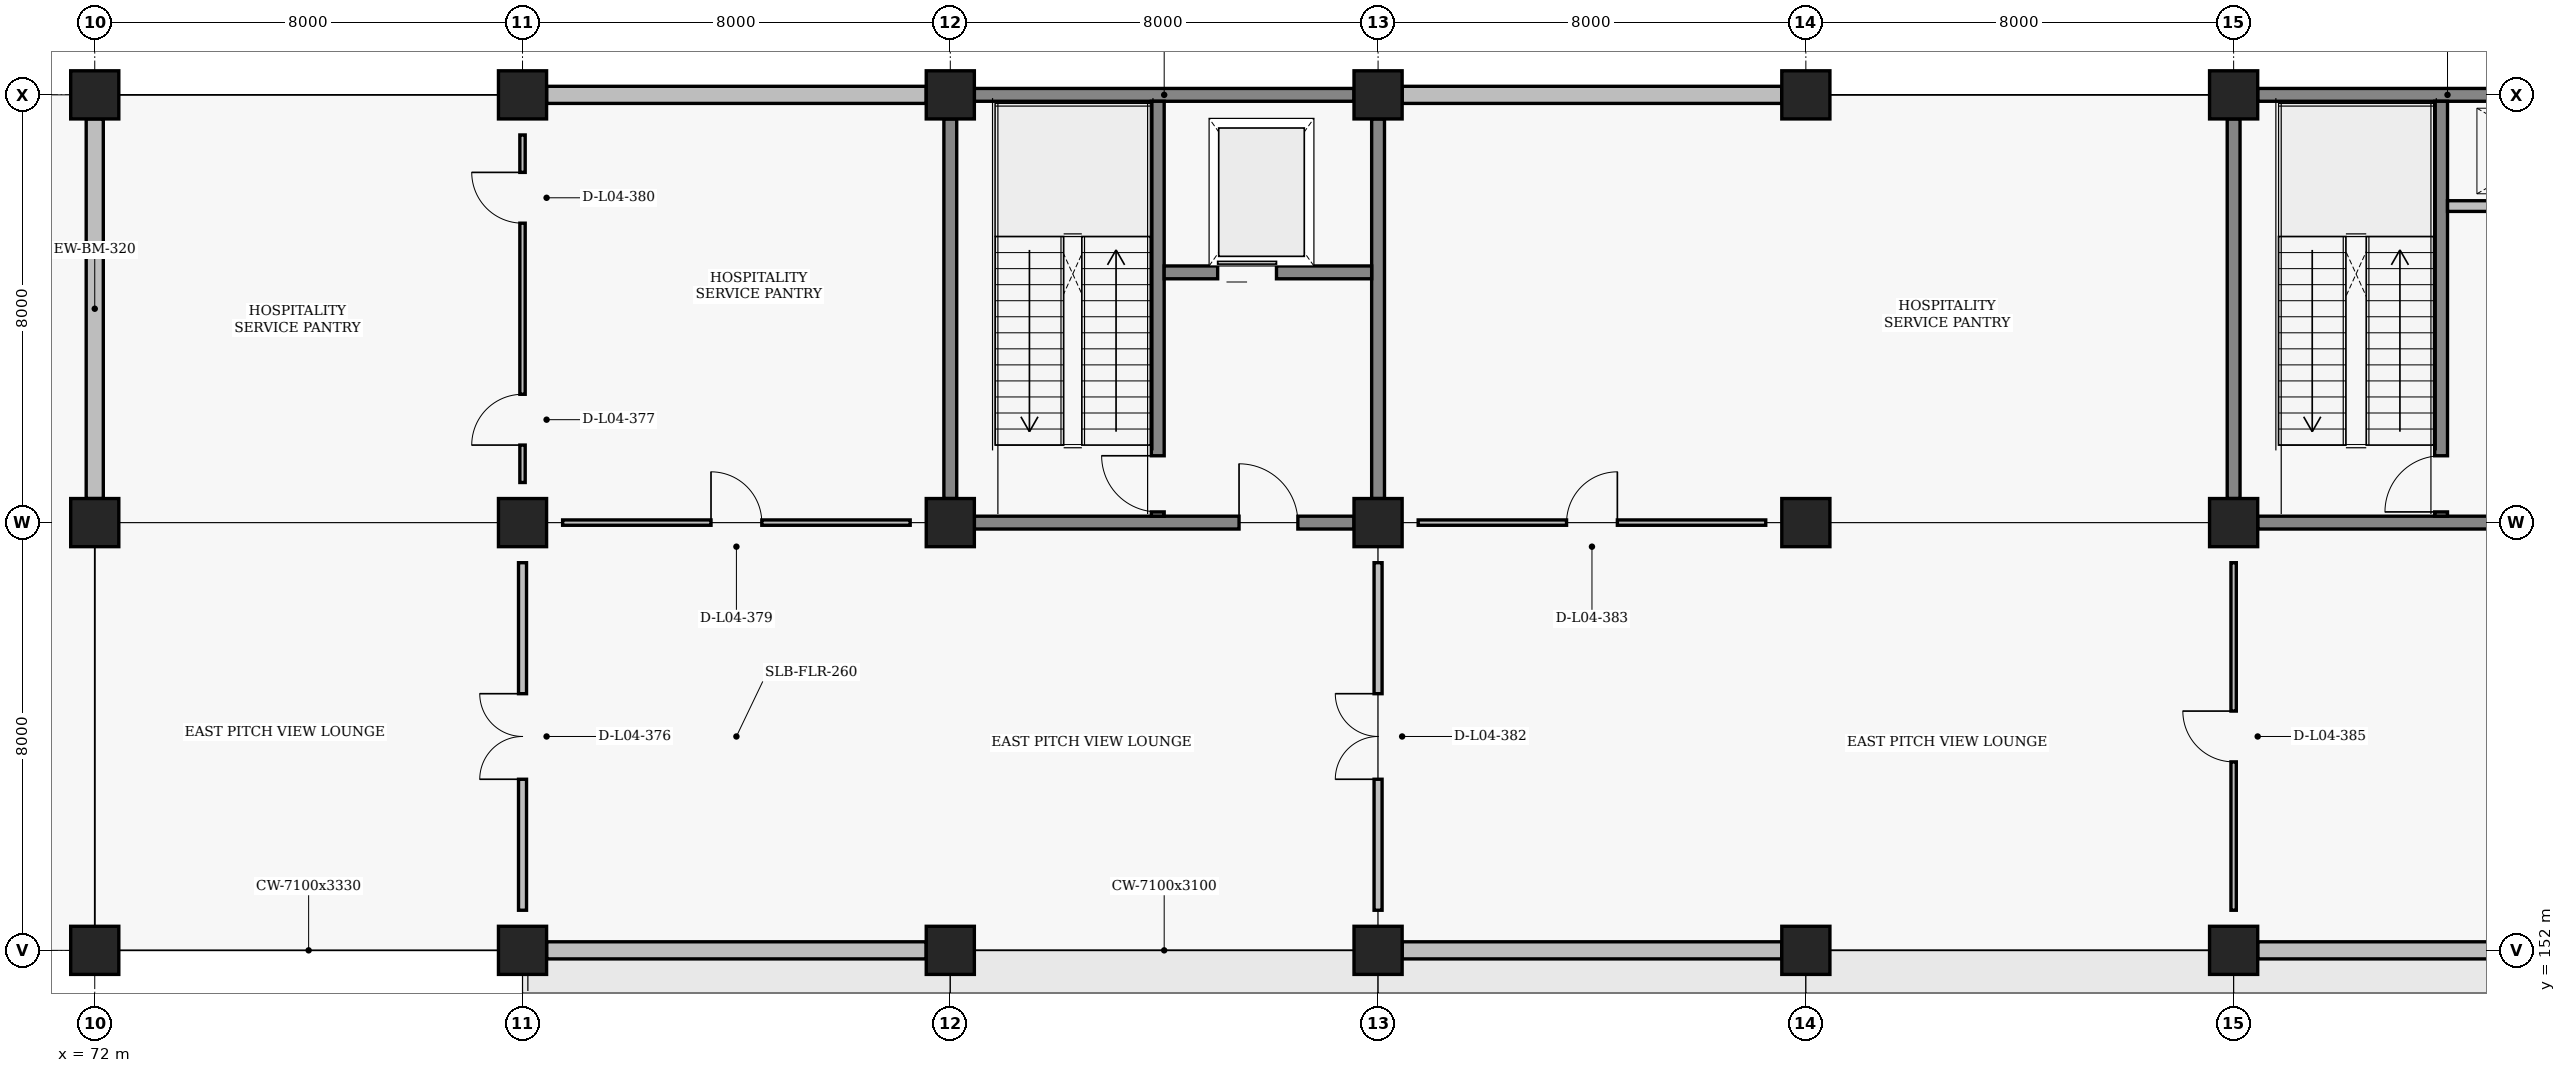
"""IFC4 building model, lengths in metres.
Left out: names, types, materials, properties, quantities, classifications, styles, units other than length and angle.
Written with IfcOpenShell. Run it as: python <this file> out.ifc"""

import sys

from ifc_helpers import new_model, si_unit, direction, frame, frame_2d, origin, origin_2d, place, context, subcontext, project, spatial, rectangle, extrude, element, fill, save


model = new_model("IFC4")
c1 = context("Model", 3, precision=1e-05, world=origin(), true_north=direction((0.0, 1.0)))
c2 = subcontext(c1, "Body", "Model", "MODEL_VIEW")
j1 = project(units=[si_unit("LENGTHUNIT", "METRE"), si_unit("PLANEANGLEUNIT", "RADIAN")], contexts=[c1])
p1 = place(None, origin())
s1 = spatial("IfcSite", under=j1, at=p1, CompositionType="ELEMENT")
p2 = place(p1, origin())
s2 = spatial("IfcBuilding", under=s1, at=p2, CompositionType="ELEMENT")
p3 = place(p2, frame((0.0, 0.0, 14.4)))
s3 = spatial("IfcBuildingStorey", under=s2, at=p3, CompositionType="ELEMENT", Elevation=14.4)
for number, where, z_axis, x_axis in (
    (1, (72.0, 152.0, 0.0), (0.0, 0.0, 1.0), (1.0, 0.0, 0.0)),
    (2, (72.0, 160.0, 0.0), (0.0, 0.0, 1.0), (1.0, 0.0, 0.0)),
    (3, (72.0, 168.0, 0.0), (0.0, 0.0, 1.0), (1.0, 0.0, 0.0)),
    (4, (80.0, 152.0, 0.0), (0.0, 0.0, 1.0), (1.0, 0.0, 0.0)),
    (5, (80.0, 160.0, 0.0), (0.0, 0.0, 1.0), (1.0, 0.0, 0.0)),
    (6, (80.0, 168.0, 0.0), (0.0, 0.0, 1.0), (1.0, 0.0, 0.0)),
    (7, (88.0, 152.0, 0.0), (0.0, 0.0, 1.0), (1.0, 0.0, 0.0)),
    (8, (88.0, 160.0, 0.0), (0.0, 0.0, 1.0), (1.0, 0.0, 0.0)),
    (9, (88.0, 168.0, 0.0), (0.0, 0.0, 1.0), (1.0, 0.0, 0.0)),
    (10, (96.0, 152.0, 0.0), (0.0, 0.0, 1.0), (1.0, 0.0, 0.0)),
    (11, (96.0, 160.0, 0.0), (0.0, 0.0, 1.0), (1.0, 0.0, 0.0)),
    (12, (96.0, 168.0, 0.0), (0.0, 0.0, 1.0), (1.0, 0.0, 0.0)),
    (13, (104.0, 152.0, 0.0), (0.0, 0.0, 1.0), (1.0, 0.0, 0.0)),
    (14, (104.0, 160.0, 0.0), (0.0, 0.0, 1.0), (1.0, 0.0, 0.0)),
    (15, (104.0, 168.0, 0.0), (0.0, 0.0, 1.0), (1.0, 0.0, 0.0)),
    (16, (112.0, 152.0, 0.0), (0.0, 0.0, 1.0), (1.0, 0.0, 0.0)),
    (17, (112.0, 160.0, 0.0), (0.0, 0.0, 1.0), (1.0, 0.0, 0.0)),
    (18, (112.0, 168.0, 0.0), (0.0, 0.0, 1.0), (1.0, 0.0, 0.0)),
):
    element("IfcColumn", number, at=place(p3, frame(where, z_axis=z_axis, x_axis=x_axis)), inside=s3, PredefinedType="COLUMN", context=c2, shape_type="SweptSolid", body=[
        extrude(rectangle(XDim=0.9, YDim=0.9, at=origin_2d()), origin(), (0.0, 0.0, 1.0), 4.2),
    ])
p4 = place(p3, frame((72.0, 160.45, 0.0), z_axis=(0.0, 0.0, 1.0), x_axis=(0.0, 1.0, 0.0)))
e19 = element("IfcWall", 19, at=p4, inside=s3, PredefinedType="SOLIDWALL", context=c2, shape_type="SweptSolid", body=[
    extrude(rectangle(XDim=7.1, YDim=0.32, at=frame_2d((3.55, 0.0))), origin(), (0.0, 0.0, 1.0), 3.35),
])
p5 = place(p3, frame((80.45, 152.0, 0.0), z_axis=(0.0, 0.0, 1.0), x_axis=(1.0, 0.0, 0.0)))
e20 = element("IfcWall", 20, at=p5, inside=s3, PredefinedType="SOLIDWALL", context=c2, shape_type="SweptSolid", body=[
    extrude(rectangle(XDim=7.1, YDim=0.32, at=frame_2d((3.55, 0.0))), origin(), (0.0, 0.0, 1.0), 3.1),
])
p6 = place(p3, frame((80.45, 168.0, 0.0), z_axis=(0.0, 0.0, 1.0), x_axis=(1.0, 0.0, 0.0)))
e21 = element("IfcWall", 21, at=p6, inside=s3, PredefinedType="SOLIDWALL", context=c2, shape_type="SweptSolid", body=[
    extrude(rectangle(XDim=7.1, YDim=0.32, at=frame_2d((3.55, 0.0))), origin(), (0.0, 0.0, 1.0), 3.33),
])
p7 = place(p3, frame((96.45, 152.0, 0.0), z_axis=(0.0, 0.0, 1.0), x_axis=(1.0, 0.0, 0.0)))
e22 = element("IfcWall", 22, at=p7, inside=s3, PredefinedType="SOLIDWALL", context=c2, shape_type="SweptSolid", body=[
    extrude(rectangle(XDim=7.1, YDim=0.32, at=frame_2d((3.55, 0.0))), origin(), (0.0, 0.0, 1.0), 3.1),
])
p8 = place(p3, frame((96.45, 168.0, 0.0), z_axis=(0.0, 0.0, 1.0), x_axis=(1.0, 0.0, 0.0)))
e23 = element("IfcWall", 23, at=p8, inside=s3, PredefinedType="SOLIDWALL", context=c2, shape_type="SweptSolid", body=[
    extrude(rectangle(XDim=7.1, YDim=0.32, at=frame_2d((3.55, 0.0))), origin(), (0.0, 0.0, 1.0), 3.33),
])
p9 = place(p3, frame((112.45, 152.0, 0.0), z_axis=(0.0, 0.0, 1.0), x_axis=(1.0, 0.0, 0.0)))
e24 = element("IfcWall", 24, at=p9, inside=s3, PredefinedType="SOLIDWALL", context=c2, shape_type="SweptSolid", body=[
    extrude(rectangle(XDim=7.1, YDim=0.32, at=frame_2d((3.55, 0.0))), origin(), (0.0, 0.0, 1.0), 3.1),
])
p10 = place(p3, frame((88.45, 160.0, 0.0), z_axis=(0.0, 0.0, 1.0), x_axis=(1.0, 0.0, 0.0)))
e25 = element("IfcWall", 25, at=p10, inside=s3, PredefinedType="SHEAR", context=c2, shape_type="SweptSolid", body=[
    extrude(rectangle(XDim=7.1, YDim=0.24, at=frame_2d((3.55, 0.0))), origin(), (0.0, 0.0, 1.0), 3.33),
])
p11 = place(p10, frame((4.95, 0.0, 0.0)))
e26 = element("IfcOpeningElement", 26, at=p11, cuts=e25, PredefinedType="OPENING", context=c2, shape_type="SweptSolid", body=[
    extrude(rectangle(XDim=1.1, YDim=2.2, at=frame_2d((0.55, 1.1))), frame((0.0, 0.13, 0.0), z_axis=(0.0, -1.0, 0.0), x_axis=(1.0, 0.0, 0.0)), (0.0, 0.0, 1.0), 0.26),
])
for number, where, z_axis, x_axis in (
    (27, (88.45, 168.0, 0.0), (0.0, 0.0, 1.0), (1.0, 0.0, 0.0)),
    (28, (88.0, 160.45, 0.0), (0.0, 0.0, 1.0), (0.0, 1.0, 0.0)),
    (29, (96.0, 160.45, 0.0), (0.0, 0.0, 1.0), (0.0, 1.0, 0.0)),
):
    element("IfcWall", number, at=place(p3, frame(where, z_axis=z_axis, x_axis=x_axis)), inside=s3, PredefinedType="SHEAR", context=c2, shape_type="SweptSolid", body=[
        extrude(rectangle(XDim=7.1, YDim=0.24, at=frame_2d((3.55, 0.0))), origin(), (0.0, 0.0, 1.0), 3.33),
    ])
p12 = place(p3, frame((91.88, 160.12, 0.0), z_axis=(0.0, 0.0, 1.0), x_axis=(0.0, 1.0, 0.0)))
e30 = element("IfcWall", 30, at=p12, inside=s3, PredefinedType="SHEAR", context=c2, shape_type="SweptSolid", body=[
    extrude(rectangle(XDim=7.76, YDim=0.24, at=frame_2d((3.88, 0.0))), origin(), (0.0, 0.0, 1.0), 3.43),
])
p13 = place(p12, frame((0.08, 0.0, 0.0)))
e31 = element("IfcOpeningElement", 31, at=p13, cuts=e30, PredefinedType="OPENING", context=c2, shape_type="SweptSolid", body=[
    extrude(rectangle(XDim=1.05, YDim=2.15, at=frame_2d((0.525, 1.075))), frame((0.0, 0.13, 0.0), z_axis=(0.0, -1.0, 0.0), x_axis=(1.0, 0.0, 0.0)), (0.0, 0.0, 1.0), 0.26),
])
p14 = place(p3, frame((92.0, 164.68, 0.0), z_axis=(0.0, 0.0, 1.0), x_axis=(1.0, 0.0, 0.0)))
e32 = element("IfcWall", 32, at=p14, inside=s3, PredefinedType="SHEAR", context=c2, shape_type="SweptSolid", body=[
    extrude(rectangle(XDim=3.88, YDim=0.24, at=frame_2d((1.94, 0.0))), origin(), (0.0, 0.0, 1.0), 3.33),
])
p15 = place(p14, frame((1.0, 0.0, 0.0)))
e33 = element("IfcOpeningElement", 33, at=p15, cuts=e32, PredefinedType="OPENING", context=c2, shape_type="SweptSolid", body=[
    extrude(rectangle(XDim=1.1, YDim=2.15, at=frame_2d((0.55, 1.075))), frame((0.0, 0.13, 0.0), z_axis=(0.0, -1.0, 0.0), x_axis=(1.0, 0.0, 0.0)), (0.0, 0.0, 1.0), 0.26),
])
p16 = place(p3, frame((112.45, 160.0, 0.0), z_axis=(0.0, 0.0, 1.0), x_axis=(1.0, 0.0, 0.0)))
e34 = element("IfcWall", 34, at=p16, inside=s3, PredefinedType="SHEAR", context=c2, shape_type="SweptSolid", body=[
    extrude(rectangle(XDim=7.1, YDim=0.24, at=frame_2d((3.55, 0.0))), origin(), (0.0, 0.0, 1.0), 3.33),
])
p17 = place(p16, frame((4.95, 0.0, 0.0)))
e35 = element("IfcOpeningElement", 35, at=p17, cuts=e34, PredefinedType="OPENING", context=c2, shape_type="SweptSolid", body=[
    extrude(rectangle(XDim=1.1, YDim=2.2, at=frame_2d((0.55, 1.1))), frame((0.0, 0.13, 0.0), z_axis=(0.0, -1.0, 0.0), x_axis=(1.0, 0.0, 0.0)), (0.0, 0.0, 1.0), 0.26),
])
for number, where, z_axis, x_axis in (
    (36, (112.45, 168.0, 0.0), (0.0, 0.0, 1.0), (1.0, 0.0, 0.0)),
    (37, (112.0, 160.45, 0.0), (0.0, 0.0, 1.0), (0.0, 1.0, 0.0)),
):
    element("IfcWall", number, at=place(p3, frame(where, z_axis=z_axis, x_axis=x_axis)), inside=s3, PredefinedType="SHEAR", context=c2, shape_type="SweptSolid", body=[
        extrude(rectangle(XDim=7.1, YDim=0.24, at=frame_2d((3.55, 0.0))), origin(), (0.0, 0.0, 1.0), 3.33),
    ])
p18 = place(p3, frame((115.88, 160.12, 0.0), z_axis=(0.0, 0.0, 1.0), x_axis=(0.0, 1.0, 0.0)))
e38 = element("IfcWall", 38, at=p18, inside=s3, PredefinedType="SHEAR", context=c2, shape_type="SweptSolid", body=[
    extrude(rectangle(XDim=7.76, YDim=0.24, at=frame_2d((3.88, 0.0))), origin(), (0.0, 0.0, 1.0), 3.43),
])
p19 = place(p18, frame((0.08, 0.0, 0.0)))
e39 = element("IfcOpeningElement", 39, at=p19, cuts=e38, PredefinedType="OPENING", context=c2, shape_type="SweptSolid", body=[
    extrude(rectangle(XDim=1.05, YDim=2.15, at=frame_2d((0.525, 1.075))), frame((0.0, 0.13, 0.0), z_axis=(0.0, -1.0, 0.0), x_axis=(1.0, 0.0, 0.0)), (0.0, 0.0, 1.0), 0.26),
])
p20 = place(p3, frame((116.0, 165.92, 0.0), z_axis=(0.0, 0.0, 1.0), x_axis=(1.0, 0.0, 0.0)))
e40 = element("IfcWall", 40, at=p20, inside=s3, PredefinedType="PARTITIONING", context=c2, shape_type="SweptSolid", body=[
    extrude(rectangle(XDim=3.88, YDim=0.2, at=frame_2d((1.94, 0.0))), origin(), (0.0, 0.0, 1.0), 3.33),
])
p21 = place(p20, frame((1.25, 0.0, 0.0)))
e41 = element("IfcOpeningElement", 41, at=p21, cuts=e40, PredefinedType="OPENING", context=c2, shape_type="SweptSolid", body=[
    extrude(rectangle(XDim=0.85, YDim=2.05, at=frame_2d((0.425, 1.025))), frame((0.0, 0.11, 0.0), z_axis=(0.0, -1.0, 0.0), x_axis=(1.0, 0.0, 0.0)), (0.0, 0.0, 1.0), 0.22),
])
p22 = place(p3, frame((80.0, 152.75, 0.0), z_axis=(0.0, 0.0, 1.0), x_axis=(0.0, 1.0, 0.0)))
e42 = element("IfcWall", 42, at=p22, inside=s3, PredefinedType="PARTITIONING", context=c2, shape_type="SweptSolid", body=[
    extrude(rectangle(XDim=6.5, YDim=0.15, at=frame_2d((3.25, 0.0))), origin(), (0.0, 0.0, 1.0), 3.33),
])
p23 = place(p22, frame((2.45, 0.0, 0.0)))
e43 = element("IfcOpeningElement", 43, at=p23, cuts=e42, PredefinedType="OPENING", context=c2, shape_type="SweptSolid", body=[
    extrude(rectangle(XDim=1.6, YDim=2.2, at=frame_2d((0.8, 1.1))), frame((0.0, 0.085, 0.0), z_axis=(0.0, -1.0, 0.0), x_axis=(1.0, 0.0, 0.0)), (0.0, 0.0, 1.0), 0.17),
])
p24 = place(p3, frame((80.0, 160.75, 0.0), z_axis=(0.0, 0.0, 1.0), x_axis=(0.0, 1.0, 0.0)))
e44 = element("IfcWall", 44, at=p24, inside=s3, PredefinedType="PARTITIONING", context=c2, shape_type="SweptSolid", body=[
    extrude(rectangle(XDim=6.5, YDim=0.1, at=frame_2d((3.25, 0.0))), origin(), (0.0, 0.0, 1.0), 3.33),
])
p25 = place(p24, frame((0.7, 0.0, 0.0)))
e45 = element("IfcOpeningElement", 45, at=p25, cuts=e44, PredefinedType="OPENING", context=c2, shape_type="SweptSolid", body=[
    extrude(rectangle(XDim=0.95, YDim=2.1, at=frame_2d((0.475, 1.05))), frame((0.0, 0.06, 0.0), z_axis=(0.0, -1.0, 0.0), x_axis=(1.0, 0.0, 0.0)), (0.0, 0.0, 1.0), 0.12),
])
p26 = place(p24, frame((4.85, 0.0, 0.0)))
e46 = element("IfcOpeningElement", 46, at=p26, cuts=e44, PredefinedType="OPENING", context=c2, shape_type="SweptSolid", body=[
    extrude(rectangle(XDim=0.95, YDim=2.1, at=frame_2d((0.475, 1.05))), frame((0.0, 0.06, 0.0), z_axis=(0.0, -1.0, 0.0), x_axis=(1.0, 0.0, 0.0)), (0.0, 0.0, 1.0), 0.12),
])
p27 = place(p3, frame((80.75, 160.0, 0.0), z_axis=(0.0, 0.0, 1.0), x_axis=(1.0, 0.0, 0.0)))
e47 = element("IfcWall", 47, at=p27, inside=s3, PredefinedType="PARTITIONING", context=c2, shape_type="SweptSolid", body=[
    extrude(rectangle(XDim=6.5, YDim=0.1, at=frame_2d((3.25, 0.0))), origin(), (0.0, 0.0, 1.0), 3.43),
])
p28 = place(p27, frame((2.775, 0.0, 0.0)))
e48 = element("IfcOpeningElement", 48, at=p28, cuts=e47, PredefinedType="OPENING", context=c2, shape_type="SweptSolid", body=[
    extrude(rectangle(XDim=0.95, YDim=2.1, at=frame_2d((0.475, 1.05))), frame((0.0, 0.06, 0.0), z_axis=(0.0, -1.0, 0.0), x_axis=(1.0, 0.0, 0.0)), (0.0, 0.0, 1.0), 0.12),
])
p29 = place(p3, frame((96.0, 152.75, 0.0), z_axis=(0.0, 0.0, 1.0), x_axis=(0.0, 1.0, 0.0)))
e49 = element("IfcWall", 49, at=p29, inside=s3, PredefinedType="PARTITIONING", context=c2, shape_type="SweptSolid", body=[
    extrude(rectangle(XDim=6.5, YDim=0.15, at=frame_2d((3.25, 0.0))), origin(), (0.0, 0.0, 1.0), 3.33),
])
p30 = place(p29, frame((2.45, 0.0, 0.0)))
e50 = element("IfcOpeningElement", 50, at=p30, cuts=e49, PredefinedType="OPENING", context=c2, shape_type="SweptSolid", body=[
    extrude(rectangle(XDim=1.6, YDim=2.2, at=frame_2d((0.8, 1.1))), frame((0.0, 0.085, 0.0), z_axis=(0.0, -1.0, 0.0), x_axis=(1.0, 0.0, 0.0)), (0.0, 0.0, 1.0), 0.17),
])
p31 = place(p3, frame((96.75, 160.0, 0.0), z_axis=(0.0, 0.0, 1.0), x_axis=(1.0, 0.0, 0.0)))
e51 = element("IfcWall", 51, at=p31, inside=s3, PredefinedType="PARTITIONING", context=c2, shape_type="SweptSolid", body=[
    extrude(rectangle(XDim=6.5, YDim=0.1, at=frame_2d((3.25, 0.0))), origin(), (0.0, 0.0, 1.0), 3.43),
])
p32 = place(p31, frame((2.775, 0.0, 0.0)))
e52 = element("IfcOpeningElement", 52, at=p32, cuts=e51, PredefinedType="OPENING", context=c2, shape_type="SweptSolid", body=[
    extrude(rectangle(XDim=0.95, YDim=2.1, at=frame_2d((0.475, 1.05))), frame((0.0, 0.06, 0.0), z_axis=(0.0, -1.0, 0.0), x_axis=(1.0, 0.0, 0.0)), (0.0, 0.0, 1.0), 0.12),
])
p33 = place(p3, frame((112.0, 152.75, 0.0), z_axis=(0.0, 0.0, 1.0), x_axis=(0.0, 1.0, 0.0)))
e53 = element("IfcWall", 53, at=p33, inside=s3, PredefinedType="PARTITIONING", context=c2, shape_type="SweptSolid", body=[
    extrude(rectangle(XDim=6.5, YDim=0.1, at=frame_2d((3.25, 0.0))), origin(), (0.0, 0.0, 1.0), 3.33),
])
p34 = place(p33, frame((2.775, 0.0, 0.0)))
e54 = element("IfcOpeningElement", 54, at=p34, cuts=e53, PredefinedType="OPENING", context=c2, shape_type="SweptSolid", body=[
    extrude(rectangle(XDim=0.95, YDim=2.1, at=frame_2d((0.475, 1.05))), frame((0.0, 0.06, 0.0), z_axis=(0.0, -1.0, 0.0), x_axis=(1.0, 0.0, 0.0)), (0.0, 0.0, 1.0), 0.12),
])
p35 = place(p11, origin())
e55 = element("IfcDoor", 55, at=p35, inside=s3, OperationType="SINGLE_SWING_LEFT", PredefinedType="DOOR", context=c2, shape_type="SweptSolid", body=[
    extrude(rectangle(XDim=1.1, YDim=2.2, at=frame_2d((0.55, 1.1))), frame((0.0, 0.025, 0.0), z_axis=(0.0, -1.0, 0.0), x_axis=(1.0, 0.0, 0.0)), (0.0, 0.0, 1.0), 0.05),
])
fill(e26, e55)
p36 = place(p13, origin())
e56 = element("IfcDoor", 56, at=p36, inside=s3, OperationType="SINGLE_SWING_RIGHT", PredefinedType="DOOR", context=c2, shape_type="SweptSolid", body=[
    extrude(rectangle(XDim=1.05, YDim=2.15, at=frame_2d((0.525, 1.075))), frame((0.0, 0.025, 0.0), z_axis=(0.0, -1.0, 0.0), x_axis=(1.0, 0.0, 0.0)), (0.0, 0.0, 1.0), 0.05),
])
fill(e31, e56)
p37 = place(p15, origin())
e57 = element("IfcDoor", 57, at=p37, inside=s3, OperationType="SLIDING_TO_LEFT", PredefinedType="DOOR", context=c2, shape_type="SweptSolid", body=[
    extrude(rectangle(XDim=1.1, YDim=2.15, at=frame_2d((0.55, 1.075))), frame((0.0, 0.025, 0.0), z_axis=(0.0, -1.0, 0.0), x_axis=(1.0, 0.0, 0.0)), (0.0, 0.0, 1.0), 0.05),
])
fill(e33, e57)
p38 = place(p19, origin())
e58 = element("IfcDoor", 58, at=p38, inside=s3, OperationType="SINGLE_SWING_LEFT", PredefinedType="DOOR", context=c2, shape_type="SweptSolid", body=[
    extrude(rectangle(XDim=1.05, YDim=2.15, at=frame_2d((0.525, 1.075))), frame((0.0, 0.025, 0.0), z_axis=(0.0, -1.0, 0.0), x_axis=(1.0, 0.0, 0.0)), (0.0, 0.0, 1.0), 0.05),
])
fill(e39, e58)
p39 = place(p23, origin())
e59 = element("IfcDoor", 59, at=p39, inside=s3, OperationType="DOUBLE_SWING_LEFT", PredefinedType="DOOR", context=c2, shape_type="SweptSolid", body=[
    extrude(rectangle(XDim=1.6, YDim=2.2, at=frame_2d((0.8, 1.1))), frame((0.0, 0.025, 0.0), z_axis=(0.0, -1.0, 0.0), x_axis=(1.0, 0.0, 0.0)), (0.0, 0.0, 1.0), 0.05),
])
fill(e43, e59)
p40 = place(p25, origin())
e60 = element("IfcDoor", 60, at=p40, inside=s3, OperationType="SINGLE_SWING_LEFT", PredefinedType="DOOR", context=c2, shape_type="SweptSolid", body=[
    extrude(rectangle(XDim=0.95, YDim=2.1, at=frame_2d((0.475, 1.05))), frame((0.0, 0.025, 0.0), z_axis=(0.0, -1.0, 0.0), x_axis=(1.0, 0.0, 0.0)), (0.0, 0.0, 1.0), 0.05),
])
fill(e45, e60)
p41 = place(p28, origin())
e61 = element("IfcDoor", 61, at=p41, inside=s3, OperationType="SINGLE_SWING_LEFT", PredefinedType="DOOR", context=c2, shape_type="SweptSolid", body=[
    extrude(rectangle(XDim=0.95, YDim=2.1, at=frame_2d((0.475, 1.05))), frame((0.0, 0.025, 0.0), z_axis=(0.0, -1.0, 0.0), x_axis=(1.0, 0.0, 0.0)), (0.0, 0.0, 1.0), 0.05),
])
fill(e48, e61)
p42 = place(p26, origin())
e62 = element("IfcDoor", 62, at=p42, inside=s3, OperationType="SINGLE_SWING_RIGHT", PredefinedType="DOOR", context=c2, shape_type="SweptSolid", body=[
    extrude(rectangle(XDim=0.95, YDim=2.1, at=frame_2d((0.475, 1.05))), frame((0.0, 0.025, 0.0), z_axis=(0.0, -1.0, 0.0), x_axis=(1.0, 0.0, 0.0)), (0.0, 0.0, 1.0), 0.05),
])
fill(e46, e62)
p43 = place(p30, origin())
e63 = element("IfcDoor", 63, at=p43, inside=s3, OperationType="DOUBLE_SWING_LEFT", PredefinedType="DOOR", context=c2, shape_type="SweptSolid", body=[
    extrude(rectangle(XDim=1.6, YDim=2.2, at=frame_2d((0.8, 1.1))), frame((0.0, 0.025, 0.0), z_axis=(0.0, -1.0, 0.0), x_axis=(1.0, 0.0, 0.0)), (0.0, 0.0, 1.0), 0.05),
])
fill(e50, e63)
p44 = place(p32, origin())
e64 = element("IfcDoor", 64, at=p44, inside=s3, OperationType="SINGLE_SWING_RIGHT", PredefinedType="DOOR", context=c2, shape_type="SweptSolid", body=[
    extrude(rectangle(XDim=0.95, YDim=2.1, at=frame_2d((0.475, 1.05))), frame((0.0, 0.025, 0.0), z_axis=(0.0, -1.0, 0.0), x_axis=(1.0, 0.0, 0.0)), (0.0, 0.0, 1.0), 0.05),
])
fill(e52, e64)
p45 = place(p34, origin())
e65 = element("IfcDoor", 65, at=p45, inside=s3, OperationType="SINGLE_SWING_RIGHT", PredefinedType="DOOR", context=c2, shape_type="SweptSolid", body=[
    extrude(rectangle(XDim=0.95, YDim=2.1, at=frame_2d((0.475, 1.05))), frame((0.0, 0.025, 0.0), z_axis=(0.0, -1.0, 0.0), x_axis=(1.0, 0.0, 0.0)), (0.0, 0.0, 1.0), 0.05),
])
fill(e54, e65)
save(model, sys.argv[1])
